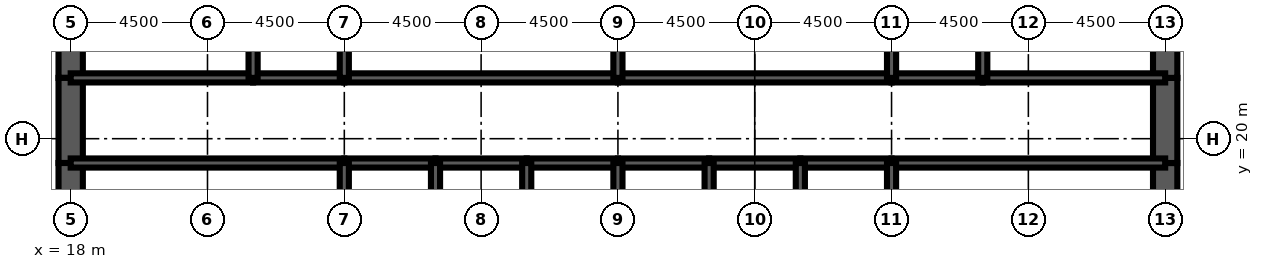
"""IFC4 building model, lengths in metres.
Left out: names, types, materials, properties, quantities, classifications, styles, units other than length and angle.
Written with IfcOpenShell. Run it as: python <this file> out.ifc"""

import sys

from ifc_helpers import new_model, si_unit, direction, frame, frame_2d, origin, place, context, subcontext, project, spatial, rectangle, extrude, element, fill, save


model = new_model("IFC4")
c1 = context("Model", 3, precision=1e-05, world=origin(), true_north=direction((0.0, 1.0)))
c2 = subcontext(c1, "Body", "Model", "MODEL_VIEW")
j1 = project(units=[si_unit("LENGTHUNIT", "METRE"), si_unit("PLANEANGLEUNIT", "RADIAN")], contexts=[c1])
p1 = place(None, origin())
s1 = spatial("IfcSite", under=j1, at=p1, CompositionType="ELEMENT")
p2 = place(p1, origin())
s2 = spatial("IfcBuilding", under=s1, at=p2, CompositionType="ELEMENT")
p3 = place(p2, frame((0.0, 0.0, 261.4)))
s3 = spatial("IfcBuildingStorey", under=s2, at=p3, CompositionType="ELEMENT", Elevation=261.4)
p4 = place(p3, frame((18.0, 26.0, 0.0), z_axis=(0.0, 0.0, 1.0), x_axis=(0.0, -1.0, 0.0)))
e1 = element("IfcWall", 1, at=p4, inside=s3, PredefinedType="SHEAR", context=c2, shape_type="SweptSolid", body=[
    extrude(rectangle(XDim=4.0, YDim=0.8, at=frame_2d((2.0, 0.0))), origin(), (0.0, 0.0, 1.0), 4.2),
])
p5 = place(p3, frame((18.0, 22.0, 0.0), z_axis=(0.0, 0.0, 1.0), x_axis=(0.0, -1.0, 0.0)))
e2 = element("IfcWall", 2, at=p5, inside=s3, PredefinedType="SHEAR", context=c2, shape_type="SweptSolid", body=[
    extrude(rectangle(XDim=2.8, YDim=0.8, at=frame_2d((1.4, 0.0))), origin(), (0.0, 0.0, 1.0), 4.2),
])
p6 = place(p5, frame((0.6, 0.0, 0.0)))
e3 = element("IfcOpeningElement", 3, at=p6, cuts=e2, PredefinedType="OPENING", context=c2, shape_type="SweptSolid", body=[
    extrude(rectangle(XDim=1.8, YDim=2.1, at=frame_2d((0.9, 1.05))), frame((0.0, 0.41, 0.0), z_axis=(0.0, -1.0, 0.0), x_axis=(1.0, 0.0, 0.0)), (0.0, 0.0, 1.0), 0.82),
])
for number, where, z_axis, x_axis in (
    (4, (18.0, 19.2, 0.0), (0.0, 0.0, 1.0), (0.0, -1.0, 0.0)),
    (5, (54.0, 16.0, 0.0), (0.0, 0.0, 1.0), (0.0, 1.0, 0.0)),
):
    element("IfcWall", number, at=place(p3, frame(where, z_axis=z_axis, x_axis=x_axis)), inside=s3, PredefinedType="SHEAR", context=c2, shape_type="SweptSolid", body=[
        extrude(rectangle(XDim=3.2, YDim=0.8, at=frame_2d((1.6, 0.0))), origin(), (0.0, 0.0, 1.0), 4.2),
    ])
p7 = place(p3, frame((54.0, 19.2, 0.0), z_axis=(0.0, 0.0, 1.0), x_axis=(0.0, 1.0, 0.0)))
e6 = element("IfcWall", 6, at=p7, inside=s3, PredefinedType="SHEAR", context=c2, shape_type="SweptSolid", body=[
    extrude(rectangle(XDim=2.8, YDim=0.8, at=frame_2d((1.4, 0.0))), origin(), (0.0, 0.0, 1.0), 4.2),
])
p8 = place(p7, frame((0.4, 0.0, 0.0)))
e7 = element("IfcOpeningElement", 7, at=p8, cuts=e6, PredefinedType="OPENING", context=c2, shape_type="SweptSolid", body=[
    extrude(rectangle(XDim=1.8, YDim=2.1, at=frame_2d((0.9, 1.05))), frame((0.0, 0.41, 0.0), z_axis=(0.0, -1.0, 0.0), x_axis=(1.0, 0.0, 0.0)), (0.0, 0.0, 1.0), 0.82),
])
p9 = place(p3, frame((54.0, 22.0, 0.0), z_axis=(0.0, 0.0, 1.0), x_axis=(0.0, 1.0, 0.0)))
e8 = element("IfcWall", 8, at=p9, inside=s3, PredefinedType="SHEAR", context=c2, shape_type="SweptSolid", body=[
    extrude(rectangle(XDim=4.0, YDim=0.8, at=frame_2d((2.0, 0.0))), origin(), (0.0, 0.0, 1.0), 4.2),
])
p10 = place(p3, frame((18.0, 19.2, 0.0), z_axis=(0.0, 0.0, 1.0), x_axis=(1.0, 0.0, 0.0)))
e9 = element("IfcWall", 9, at=p10, inside=s3, PredefinedType="SOLIDWALL", context=c2, shape_type="SweptSolid", body=[
    extrude(rectangle(XDim=9.0, YDim=0.3, at=frame_2d((4.5, 0.0))), origin(), (0.0, 0.0, 1.0), 4.2),
])
p11 = place(p10, frame((0.65, 0.0, 0.0)))
e10 = element("IfcOpeningElement", 10, at=p11, cuts=e9, PredefinedType="OPENING", context=c2, shape_type="SweptSolid", body=[
    extrude(rectangle(XDim=1.0, YDim=2.1, at=frame_2d((0.5, 1.05))), frame((0.0, 0.16, 0.0), z_axis=(0.0, -1.0, 0.0), x_axis=(1.0, 0.0, 0.0)), (0.0, 0.0, 1.0), 0.32),
])
p12 = place(p3, frame((27.0, 19.2, 0.0), z_axis=(0.0, 0.0, 1.0), x_axis=(1.0, 0.0, 0.0)))
e11 = element("IfcWall", 11, at=p12, inside=s3, PredefinedType="SOLIDWALL", context=c2, shape_type="SweptSolid", body=[
    extrude(rectangle(XDim=3.0, YDim=0.3, at=frame_2d((1.5, 0.0))), origin(), (0.0, 0.0, 1.0), 4.2),
])
p13 = place(p12, frame((0.95, 0.0, 0.0)))
e12 = element("IfcOpeningElement", 12, at=p13, cuts=e11, PredefinedType="OPENING", context=c2, shape_type="SweptSolid", body=[
    extrude(rectangle(XDim=1.1, YDim=2.2, at=frame_2d((0.55, 1.1))), frame((0.0, 0.16, 0.0), z_axis=(0.0, -1.0, 0.0), x_axis=(1.0, 0.0, 0.0)), (0.0, 0.0, 1.0), 0.32),
])
p14 = place(p3, frame((30.0, 19.2, 0.0), z_axis=(0.0, 0.0, 1.0), x_axis=(1.0, 0.0, 0.0)))
e13 = element("IfcWall", 13, at=p14, inside=s3, PredefinedType="SOLIDWALL", context=c2, shape_type="SweptSolid", body=[
    extrude(rectangle(XDim=3.0, YDim=0.3, at=frame_2d((1.5, 0.0))), origin(), (0.0, 0.0, 1.0), 4.2),
])
p15 = place(p14, frame((0.95, 0.0, 0.0)))
e14 = element("IfcOpeningElement", 14, at=p15, cuts=e13, PredefinedType="OPENING", context=c2, shape_type="SweptSolid", body=[
    extrude(rectangle(XDim=1.1, YDim=2.2, at=frame_2d((0.55, 1.1))), frame((0.0, 0.16, 0.0), z_axis=(0.0, -1.0, 0.0), x_axis=(1.0, 0.0, 0.0)), (0.0, 0.0, 1.0), 0.32),
])
p16 = place(p3, frame((33.0, 19.2, 0.0), z_axis=(0.0, 0.0, 1.0), x_axis=(1.0, 0.0, 0.0)))
e15 = element("IfcWall", 15, at=p16, inside=s3, PredefinedType="SOLIDWALL", context=c2, shape_type="SweptSolid", body=[
    extrude(rectangle(XDim=3.0, YDim=0.3, at=frame_2d((1.5, 0.0))), origin(), (0.0, 0.0, 1.0), 4.2),
])
p17 = place(p16, frame((0.95, 0.0, 0.0)))
e16 = element("IfcOpeningElement", 16, at=p17, cuts=e15, PredefinedType="OPENING", context=c2, shape_type="SweptSolid", body=[
    extrude(rectangle(XDim=1.1, YDim=2.2, at=frame_2d((0.55, 1.1))), frame((0.0, 0.16, 0.0), z_axis=(0.0, -1.0, 0.0), x_axis=(1.0, 0.0, 0.0)), (0.0, 0.0, 1.0), 0.32),
])
p18 = place(p3, frame((36.0, 19.2, 0.0), z_axis=(0.0, 0.0, 1.0), x_axis=(1.0, 0.0, 0.0)))
e17 = element("IfcWall", 17, at=p18, inside=s3, PredefinedType="SOLIDWALL", context=c2, shape_type="SweptSolid", body=[
    extrude(rectangle(XDim=3.0, YDim=0.3, at=frame_2d((1.5, 0.0))), origin(), (0.0, 0.0, 1.0), 4.2),
])
p19 = place(p18, frame((0.95, 0.0, 0.0)))
e18 = element("IfcOpeningElement", 18, at=p19, cuts=e17, PredefinedType="OPENING", context=c2, shape_type="SweptSolid", body=[
    extrude(rectangle(XDim=1.1, YDim=2.2, at=frame_2d((0.55, 1.1))), frame((0.0, 0.16, 0.0), z_axis=(0.0, -1.0, 0.0), x_axis=(1.0, 0.0, 0.0)), (0.0, 0.0, 1.0), 0.32),
])
p20 = place(p3, frame((39.0, 19.2, 0.0), z_axis=(0.0, 0.0, 1.0), x_axis=(1.0, 0.0, 0.0)))
e19 = element("IfcWall", 19, at=p20, inside=s3, PredefinedType="SOLIDWALL", context=c2, shape_type="SweptSolid", body=[
    extrude(rectangle(XDim=3.0, YDim=0.3, at=frame_2d((1.5, 0.0))), origin(), (0.0, 0.0, 1.0), 4.2),
])
p21 = place(p20, frame((1.0, 0.0, 0.0)))
e20 = element("IfcOpeningElement", 20, at=p21, cuts=e19, PredefinedType="OPENING", context=c2, shape_type="SweptSolid", body=[
    extrude(rectangle(XDim=1.0, YDim=2.1, at=frame_2d((0.5, 1.05))), frame((0.0, 0.16, 0.0), z_axis=(0.0, -1.0, 0.0), x_axis=(1.0, 0.0, 0.0)), (0.0, 0.0, 1.0), 0.32),
])
p22 = place(p3, frame((42.0, 19.2, 0.0), z_axis=(0.0, 0.0, 1.0), x_axis=(1.0, 0.0, 0.0)))
e21 = element("IfcWall", 21, at=p22, inside=s3, PredefinedType="SOLIDWALL", context=c2, shape_type="SweptSolid", body=[
    extrude(rectangle(XDim=3.0, YDim=0.3, at=frame_2d((1.5, 0.0))), origin(), (0.0, 0.0, 1.0), 4.2),
])
p23 = place(p22, frame((1.0, 0.0, 0.0)))
e22 = element("IfcOpeningElement", 22, at=p23, cuts=e21, PredefinedType="OPENING", context=c2, shape_type="SweptSolid", body=[
    extrude(rectangle(XDim=1.0, YDim=2.1, at=frame_2d((0.5, 1.05))), frame((0.0, 0.16, 0.0), z_axis=(0.0, -1.0, 0.0), x_axis=(1.0, 0.0, 0.0)), (0.0, 0.0, 1.0), 0.32),
])
p24 = place(p3, frame((45.0, 19.2, 0.0), z_axis=(0.0, 0.0, 1.0), x_axis=(1.0, 0.0, 0.0)))
e23 = element("IfcWall", 23, at=p24, inside=s3, PredefinedType="SOLIDWALL", context=c2, shape_type="SweptSolid", body=[
    extrude(rectangle(XDim=9.0, YDim=0.3, at=frame_2d((4.5, 0.0))), origin(), (0.0, 0.0, 1.0), 4.2),
])
p25 = place(p24, frame((7.35, 0.0, 0.0)))
e24 = element("IfcOpeningElement", 24, at=p25, cuts=e23, PredefinedType="OPENING", context=c2, shape_type="SweptSolid", body=[
    extrude(rectangle(XDim=1.0, YDim=2.1, at=frame_2d((0.5, 1.05))), frame((0.0, 0.16, 0.0), z_axis=(0.0, -1.0, 0.0), x_axis=(1.0, 0.0, 0.0)), (0.0, 0.0, 1.0), 0.32),
])
p26 = place(p3, frame((18.0, 22.0, 0.0), z_axis=(0.0, 0.0, 1.0), x_axis=(1.0, 0.0, 0.0)))
e25 = element("IfcWall", 25, at=p26, inside=s3, PredefinedType="SOLIDWALL", context=c2, shape_type="SweptSolid", body=[
    extrude(rectangle(XDim=6.0, YDim=0.3, at=frame_2d((3.0, 0.0))), origin(), (0.0, 0.0, 1.0), 4.2),
])
p27 = place(p26, frame((4.4, 0.0, 0.0)))
e26 = element("IfcOpeningElement", 26, at=p27, cuts=e25, PredefinedType="OPENING", context=c2, shape_type="SweptSolid", body=[
    extrude(rectangle(XDim=1.0, YDim=2.1, at=frame_2d((0.5, 1.05))), frame((0.0, 0.16, 0.0), z_axis=(0.0, -1.0, 0.0), x_axis=(1.0, 0.0, 0.0)), (0.0, 0.0, 1.0), 0.32),
])
p28 = place(p26, frame((0.95, 0.0, 0.0)))
e27 = element("IfcOpeningElement", 27, at=p28, cuts=e25, PredefinedType="OPENING", context=c2, shape_type="SweptSolid", body=[
    extrude(rectangle(XDim=1.0, YDim=2.1, at=frame_2d((0.5, 1.05))), frame((0.0, 0.16, 0.0), z_axis=(0.0, -1.0, 0.0), x_axis=(1.0, 0.0, 0.0)), (0.0, 0.0, 1.0), 0.32),
])
p29 = place(p3, frame((24.0, 22.0, 0.0), z_axis=(0.0, 0.0, 1.0), x_axis=(1.0, 0.0, 0.0)))
e28 = element("IfcWall", 28, at=p29, inside=s3, PredefinedType="SOLIDWALL", context=c2, shape_type="SweptSolid", body=[
    extrude(rectangle(XDim=3.0, YDim=0.3, at=frame_2d((1.5, 0.0))), origin(), (0.0, 0.0, 1.0), 4.2),
])
p30 = place(p29, frame((1.0, 0.0, 0.0)))
e29 = element("IfcOpeningElement", 29, at=p30, cuts=e28, PredefinedType="OPENING", context=c2, shape_type="SweptSolid", body=[
    extrude(rectangle(XDim=1.0, YDim=2.1, at=frame_2d((0.5, 1.05))), frame((0.0, 0.16, 0.0), z_axis=(0.0, -1.0, 0.0), x_axis=(1.0, 0.0, 0.0)), (0.0, 0.0, 1.0), 0.32),
])
p31 = place(p3, frame((27.0, 22.0, 0.0), z_axis=(0.0, 0.0, 1.0), x_axis=(1.0, 0.0, 0.0)))
e30 = element("IfcWall", 30, at=p31, inside=s3, PredefinedType="SOLIDWALL", context=c2, shape_type="SweptSolid", body=[
    extrude(rectangle(XDim=9.0, YDim=0.3, at=frame_2d((4.5, 0.0))), origin(), (0.0, 0.0, 1.0), 4.2),
])
p32 = place(p31, frame((4.0, 0.0, 0.0)))
e31 = element("IfcOpeningElement", 31, at=p32, cuts=e30, PredefinedType="OPENING", context=c2, shape_type="SweptSolid", body=[
    extrude(rectangle(XDim=1.0, YDim=2.1, at=frame_2d((0.5, 1.05))), frame((0.0, 0.16, 0.0), z_axis=(0.0, -1.0, 0.0), x_axis=(1.0, 0.0, 0.0)), (0.0, 0.0, 1.0), 0.32),
])
p33 = place(p3, frame((36.0, 22.0, 0.0), z_axis=(0.0, 0.0, 1.0), x_axis=(1.0, 0.0, 0.0)))
e32 = element("IfcWall", 32, at=p33, inside=s3, PredefinedType="SOLIDWALL", context=c2, shape_type="SweptSolid", body=[
    extrude(rectangle(XDim=9.0, YDim=0.3, at=frame_2d((4.5, 0.0))), origin(), (0.0, 0.0, 1.0), 4.2),
])
p34 = place(p33, frame((4.0, 0.0, 0.0)))
e33 = element("IfcOpeningElement", 33, at=p34, cuts=e32, PredefinedType="OPENING", context=c2, shape_type="SweptSolid", body=[
    extrude(rectangle(XDim=1.0, YDim=2.1, at=frame_2d((0.5, 1.05))), frame((0.0, 0.16, 0.0), z_axis=(0.0, -1.0, 0.0), x_axis=(1.0, 0.0, 0.0)), (0.0, 0.0, 1.0), 0.32),
])
p35 = place(p3, frame((45.0, 22.0, 0.0), z_axis=(0.0, 0.0, 1.0), x_axis=(1.0, 0.0, 0.0)))
e34 = element("IfcWall", 34, at=p35, inside=s3, PredefinedType="SOLIDWALL", context=c2, shape_type="SweptSolid", body=[
    extrude(rectangle(XDim=3.0, YDim=0.3, at=frame_2d((1.5, 0.0))), origin(), (0.0, 0.0, 1.0), 4.2),
])
p36 = place(p35, frame((1.0, 0.0, 0.0)))
e35 = element("IfcOpeningElement", 35, at=p36, cuts=e34, PredefinedType="OPENING", context=c2, shape_type="SweptSolid", body=[
    extrude(rectangle(XDim=1.0, YDim=2.1, at=frame_2d((0.5, 1.05))), frame((0.0, 0.16, 0.0), z_axis=(0.0, -1.0, 0.0), x_axis=(1.0, 0.0, 0.0)), (0.0, 0.0, 1.0), 0.32),
])
p37 = place(p3, frame((48.0, 22.0, 0.0), z_axis=(0.0, 0.0, 1.0), x_axis=(1.0, 0.0, 0.0)))
e36 = element("IfcWall", 36, at=p37, inside=s3, PredefinedType="SOLIDWALL", context=c2, shape_type="SweptSolid", body=[
    extrude(rectangle(XDim=6.0, YDim=0.3, at=frame_2d((3.0, 0.0))), origin(), (0.0, 0.0, 1.0), 4.2),
])
p38 = place(p37, frame((2.0, 0.0, 0.0)))
e37 = element("IfcOpeningElement", 37, at=p38, cuts=e36, PredefinedType="OPENING", context=c2, shape_type="SweptSolid", body=[
    extrude(rectangle(XDim=1.0, YDim=2.1, at=frame_2d((0.5, 1.05))), frame((0.0, 0.16, 0.0), z_axis=(0.0, -1.0, 0.0), x_axis=(1.0, 0.0, 0.0)), (0.0, 0.0, 1.0), 0.32),
])
p39 = place(p37, frame((4.05, 0.0, 0.0)))
e38 = element("IfcOpeningElement", 38, at=p39, cuts=e36, PredefinedType="OPENING", context=c2, shape_type="SweptSolid", body=[
    extrude(rectangle(XDim=1.0, YDim=2.1, at=frame_2d((0.5, 1.05))), frame((0.0, 0.16, 0.0), z_axis=(0.0, -1.0, 0.0), x_axis=(1.0, 0.0, 0.0)), (0.0, 0.0, 1.0), 0.32),
])
for number, where, z_axis, x_axis in (
    (39, (27.0, 16.0, 0.0), (0.0, 0.0, 1.0), (0.0, 1.0, 0.0)),
    (40, (30.0, 16.0, 0.0), (0.0, 0.0, 1.0), (0.0, 1.0, 0.0)),
    (41, (33.0, 16.0, 0.0), (0.0, 0.0, 1.0), (0.0, 1.0, 0.0)),
    (42, (36.0, 16.0, 0.0), (0.0, 0.0, 1.0), (0.0, 1.0, 0.0)),
    (43, (39.0, 16.0, 0.0), (0.0, 0.0, 1.0), (0.0, 1.0, 0.0)),
    (44, (42.0, 16.0, 0.0), (0.0, 0.0, 1.0), (0.0, 1.0, 0.0)),
    (45, (45.0, 16.0, 0.0), (0.0, 0.0, 1.0), (0.0, 1.0, 0.0)),
):
    element("IfcWall", number, at=place(p3, frame(where, z_axis=z_axis, x_axis=x_axis)), inside=s3, PredefinedType="SOLIDWALL", context=c2, shape_type="SweptSolid", body=[
        extrude(rectangle(XDim=3.2, YDim=0.3, at=frame_2d((1.6, 0.0))), origin(), (0.0, 0.0, 1.0), 4.2),
    ])
for number, where, z_axis, x_axis in (
    (46, (24.0, 22.0, 0.0), (0.0, 0.0, 1.0), (0.0, 1.0, 0.0)),
    (47, (27.0, 22.0, 0.0), (0.0, 0.0, 1.0), (0.0, 1.0, 0.0)),
    (48, (36.0, 22.0, 0.0), (0.0, 0.0, 1.0), (0.0, 1.0, 0.0)),
    (49, (45.0, 22.0, 0.0), (0.0, 0.0, 1.0), (0.0, 1.0, 0.0)),
    (50, (48.0, 22.0, 0.0), (0.0, 0.0, 1.0), (0.0, 1.0, 0.0)),
):
    element("IfcWall", number, at=place(p3, frame(where, z_axis=z_axis, x_axis=x_axis)), inside=s3, PredefinedType="SOLIDWALL", context=c2, shape_type="SweptSolid", body=[
        extrude(rectangle(XDim=4.0, YDim=0.3, at=frame_2d((2.0, 0.0))), origin(), (0.0, 0.0, 1.0), 4.2),
    ])
for number, where, z_axis, x_axis in (
    (51, (20.575, 22.15, 0.0), (0.0, 0.0, 1.0), (0.0, 1.0, 0.0)),
    (52, (51.425, 22.15, 0.0), (0.0, 0.0, 1.0), (0.0, 1.0, 0.0)),
):
    element("IfcWall", number, at=place(p3, frame(where, z_axis=z_axis, x_axis=x_axis)), inside=s3, PredefinedType="PARTITIONING", context=c2, shape_type="SweptSolid", body=[
        extrude(rectangle(XDim=3.7, YDim=0.15, at=frame_2d((1.85, 0.0))), origin(), (0.0, 0.0, 1.0), 3.0),
    ])
p40 = place(p13, origin())
e53 = element("IfcDoor", 53, at=p40, inside=s3, OperationType="DOUBLE_DOOR_SLIDING", PredefinedType="USERDEFINED", context=c2, shape_type="SweptSolid", body=[
    extrude(rectangle(XDim=1.1, YDim=2.2, at=frame_2d((0.55, 1.1))), frame((0.0, 0.025, 0.0), z_axis=(0.0, -1.0, 0.0), x_axis=(1.0, 0.0, 0.0)), (0.0, 0.0, 1.0), 0.05),
])
fill(e12, e53)
p41 = place(p15, origin())
e54 = element("IfcDoor", 54, at=p41, inside=s3, OperationType="DOUBLE_DOOR_SLIDING", PredefinedType="USERDEFINED", context=c2, shape_type="SweptSolid", body=[
    extrude(rectangle(XDim=1.1, YDim=2.2, at=frame_2d((0.55, 1.1))), frame((0.0, 0.025, 0.0), z_axis=(0.0, -1.0, 0.0), x_axis=(1.0, 0.0, 0.0)), (0.0, 0.0, 1.0), 0.05),
])
fill(e14, e54)
p42 = place(p17, origin())
e55 = element("IfcDoor", 55, at=p42, inside=s3, OperationType="DOUBLE_DOOR_SLIDING", PredefinedType="USERDEFINED", context=c2, shape_type="SweptSolid", body=[
    extrude(rectangle(XDim=1.1, YDim=2.2, at=frame_2d((0.55, 1.1))), frame((0.0, 0.025, 0.0), z_axis=(0.0, -1.0, 0.0), x_axis=(1.0, 0.0, 0.0)), (0.0, 0.0, 1.0), 0.05),
])
fill(e16, e55)
p43 = place(p19, origin())
e56 = element("IfcDoor", 56, at=p43, inside=s3, OperationType="DOUBLE_DOOR_SLIDING", PredefinedType="USERDEFINED", context=c2, shape_type="SweptSolid", body=[
    extrude(rectangle(XDim=1.1, YDim=2.2, at=frame_2d((0.55, 1.1))), frame((0.0, 0.025, 0.0), z_axis=(0.0, -1.0, 0.0), x_axis=(1.0, 0.0, 0.0)), (0.0, 0.0, 1.0), 0.05),
])
fill(e18, e56)
p44 = place(p11, origin())
e57 = element("IfcDoor", 57, at=p44, inside=s3, OperationType="SINGLE_SWING_LEFT", PredefinedType="DOOR", context=c2, shape_type="SweptSolid", body=[
    extrude(rectangle(XDim=1.0, YDim=2.1, at=frame_2d((0.5, 1.05))), frame((0.0, 0.025, 0.0), z_axis=(0.0, -1.0, 0.0), x_axis=(1.0, 0.0, 0.0)), (0.0, 0.0, 1.0), 0.05),
])
fill(e10, e57)
p45 = place(p25, origin())
e58 = element("IfcDoor", 58, at=p45, inside=s3, OperationType="SINGLE_SWING_RIGHT", PredefinedType="DOOR", context=c2, shape_type="SweptSolid", body=[
    extrude(rectangle(XDim=1.0, YDim=2.1, at=frame_2d((0.5, 1.05))), frame((0.0, 0.025, 0.0), z_axis=(0.0, -1.0, 0.0), x_axis=(1.0, 0.0, 0.0)), (0.0, 0.0, 1.0), 0.05),
])
fill(e24, e58)
p46 = place(p6, origin())
e59 = element("IfcDoor", 59, at=p46, inside=s3, OperationType="SINGLE_SWING_LEFT", PredefinedType="DOOR", context=c2, shape_type="SweptSolid", body=[
    extrude(rectangle(XDim=1.8, YDim=2.1, at=frame_2d((0.9, 1.05))), frame((0.0, 0.4, 0.0), z_axis=(0.0, -1.0, 0.0), x_axis=(1.0, 0.0, 0.0)), (0.0, 0.0, 1.0), 0.8),
])
fill(e3, e59)
p47 = place(p8, origin())
e60 = element("IfcDoor", 60, at=p47, inside=s3, OperationType="SINGLE_SWING_LEFT", PredefinedType="DOOR", context=c2, shape_type="SweptSolid", body=[
    extrude(rectangle(XDim=1.8, YDim=2.1, at=frame_2d((0.9, 1.05))), frame((0.0, 0.4, 0.0), z_axis=(0.0, -1.0, 0.0), x_axis=(1.0, 0.0, 0.0)), (0.0, 0.0, 1.0), 0.8),
])
fill(e7, e60)
p48 = place(p27, origin())
e61 = element("IfcDoor", 61, at=p48, inside=s3, OperationType="SINGLE_SWING_RIGHT", PredefinedType="DOOR", context=c2, shape_type="SweptSolid", body=[
    extrude(rectangle(XDim=1.0, YDim=2.1, at=frame_2d((0.5, 1.05))), frame((0.0, 0.025, 0.0), z_axis=(0.0, -1.0, 0.0), x_axis=(1.0, 0.0, 0.0)), (0.0, 0.0, 1.0), 0.05),
])
fill(e26, e61)
p49 = place(p30, origin())
e62 = element("IfcDoor", 62, at=p49, inside=s3, OperationType="SINGLE_SWING_LEFT", PredefinedType="DOOR", context=c2, shape_type="SweptSolid", body=[
    extrude(rectangle(XDim=1.0, YDim=2.1, at=frame_2d((0.5, 1.05))), frame((0.0, 0.025, 0.0), z_axis=(0.0, -1.0, 0.0), x_axis=(1.0, 0.0, 0.0)), (0.0, 0.0, 1.0), 0.05),
])
fill(e29, e62)
p50 = place(p32, origin())
e63 = element("IfcDoor", 63, at=p50, inside=s3, OperationType="SINGLE_SWING_LEFT", PredefinedType="DOOR", context=c2, shape_type="SweptSolid", body=[
    extrude(rectangle(XDim=1.0, YDim=2.1, at=frame_2d((0.5, 1.05))), frame((0.0, 0.025, 0.0), z_axis=(0.0, -1.0, 0.0), x_axis=(1.0, 0.0, 0.0)), (0.0, 0.0, 1.0), 0.05),
])
fill(e31, e63)
p51 = place(p34, origin())
e64 = element("IfcDoor", 64, at=p51, inside=s3, OperationType="SINGLE_SWING_LEFT", PredefinedType="DOOR", context=c2, shape_type="SweptSolid", body=[
    extrude(rectangle(XDim=1.0, YDim=2.1, at=frame_2d((0.5, 1.05))), frame((0.0, 0.025, 0.0), z_axis=(0.0, -1.0, 0.0), x_axis=(1.0, 0.0, 0.0)), (0.0, 0.0, 1.0), 0.05),
])
fill(e33, e64)
p52 = place(p36, origin())
e65 = element("IfcDoor", 65, at=p52, inside=s3, OperationType="SINGLE_SWING_LEFT", PredefinedType="DOOR", context=c2, shape_type="SweptSolid", body=[
    extrude(rectangle(XDim=1.0, YDim=2.1, at=frame_2d((0.5, 1.05))), frame((0.0, 0.025, 0.0), z_axis=(0.0, -1.0, 0.0), x_axis=(1.0, 0.0, 0.0)), (0.0, 0.0, 1.0), 0.05),
])
fill(e35, e65)
p53 = place(p38, origin())
e66 = element("IfcDoor", 66, at=p53, inside=s3, OperationType="SINGLE_SWING_LEFT", PredefinedType="DOOR", context=c2, shape_type="SweptSolid", body=[
    extrude(rectangle(XDim=1.0, YDim=2.1, at=frame_2d((0.5, 1.05))), frame((0.0, 0.025, 0.0), z_axis=(0.0, -1.0, 0.0), x_axis=(1.0, 0.0, 0.0)), (0.0, 0.0, 1.0), 0.05),
])
fill(e37, e66)
p54 = place(p28, origin())
e67 = element("IfcDoor", 67, at=p54, inside=s3, OperationType="SINGLE_SWING_LEFT", PredefinedType="DOOR", context=c2, shape_type="SweptSolid", body=[
    extrude(rectangle(XDim=1.0, YDim=2.1, at=frame_2d((0.5, 1.05))), frame((0.0, 0.025, 0.0), z_axis=(0.0, -1.0, 0.0), x_axis=(1.0, 0.0, 0.0)), (0.0, 0.0, 1.0), 0.05),
])
fill(e27, e67)
p55 = place(p39, origin())
e68 = element("IfcDoor", 68, at=p55, inside=s3, OperationType="SINGLE_SWING_RIGHT", PredefinedType="DOOR", context=c2, shape_type="SweptSolid", body=[
    extrude(rectangle(XDim=1.0, YDim=2.1, at=frame_2d((0.5, 1.05))), frame((0.0, 0.025, 0.0), z_axis=(0.0, -1.0, 0.0), x_axis=(1.0, 0.0, 0.0)), (0.0, 0.0, 1.0), 0.05),
])
fill(e38, e68)
p56 = place(p21, origin())
e69 = element("IfcDoor", 69, at=p56, inside=s3, OperationType="SINGLE_SWING_LEFT", PredefinedType="DOOR", context=c2, shape_type="SweptSolid", body=[
    extrude(rectangle(XDim=1.0, YDim=2.1, at=frame_2d((0.5, 1.05))), frame((0.0, 0.025, 0.0), z_axis=(0.0, -1.0, 0.0), x_axis=(1.0, 0.0, 0.0)), (0.0, 0.0, 1.0), 0.05),
])
fill(e20, e69)
p57 = place(p23, origin())
e70 = element("IfcDoor", 70, at=p57, inside=s3, OperationType="SINGLE_SWING_LEFT", PredefinedType="DOOR", context=c2, shape_type="SweptSolid", body=[
    extrude(rectangle(XDim=1.0, YDim=2.1, at=frame_2d((0.5, 1.05))), frame((0.0, 0.025, 0.0), z_axis=(0.0, -1.0, 0.0), x_axis=(1.0, 0.0, 0.0)), (0.0, 0.0, 1.0), 0.05),
])
fill(e22, e70)
save(model, sys.argv[1])
